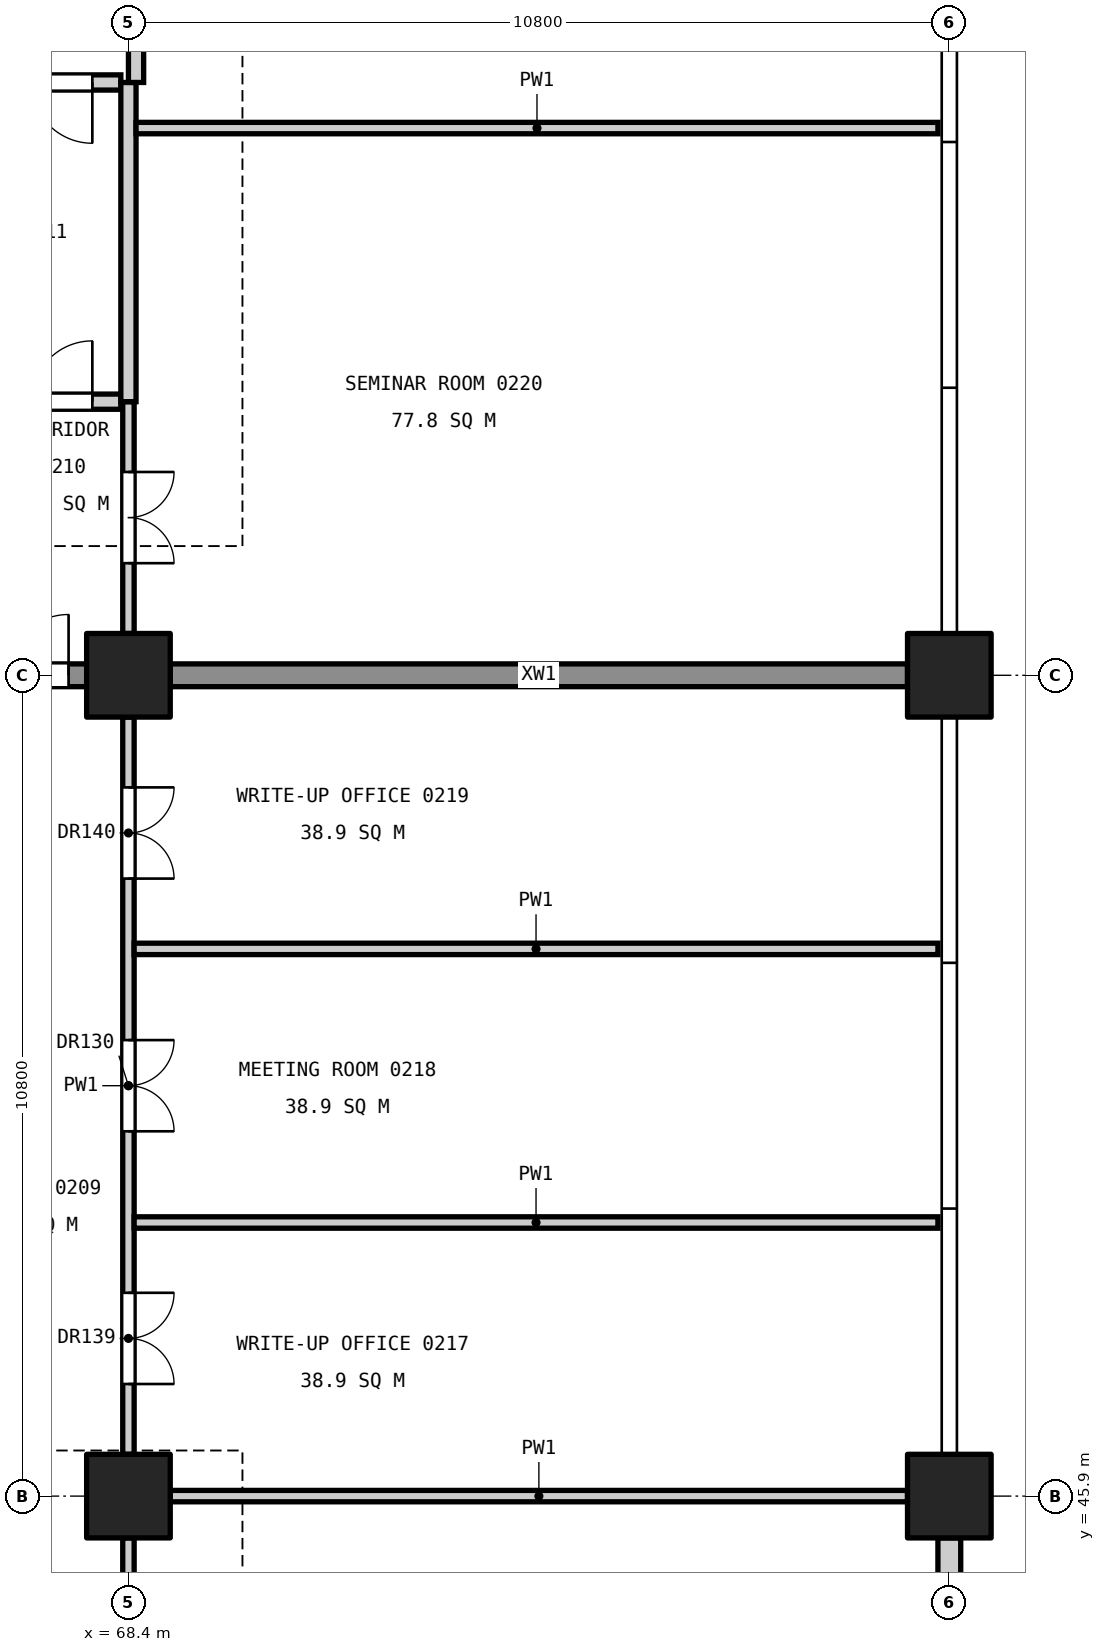
"""IFC4 building model, lengths in metres.
Left out: names, types, materials, properties, quantities, classifications, styles, units other than length and angle.
Written with IfcOpenShell. Run it as: python <this file> out.ifc"""

import sys

from ifc_helpers import new_model, si_unit, direction, frame, frame_2d, origin, origin_2d, place, context, subcontext, project, spatial, rectangle, extrude, element, fill, save


model = new_model("IFC4")
c1 = context("Model", 3, precision=1e-05, world=origin(), true_north=direction((0.0, 1.0)))
c2 = subcontext(c1, "Body", "Model", "MODEL_VIEW")
j1 = project(units=[si_unit("LENGTHUNIT", "METRE"), si_unit("PLANEANGLEUNIT", "RADIAN")], contexts=[c1])
p1 = place(None, origin())
s1 = spatial("IfcSite", under=j1, at=p1, CompositionType="ELEMENT")
p2 = place(p1, origin())
s2 = spatial("IfcBuilding", under=s1, at=p2, CompositionType="ELEMENT")
p3 = place(p2, frame((0.0, 0.0, 11.4)))
s3 = spatial("IfcBuildingStorey", under=s2, at=p3, CompositionType="ELEMENT", Elevation=11.4)
for number, where, z_axis, x_axis in (
    (1, (68.4, 45.9, 0.0), (0.0, 0.0, 1.0), (1.0, 0.0, 0.0)),
    (2, (68.4, 56.7, 0.0), (0.0, 0.0, 1.0), (1.0, 0.0, 0.0)),
    (3, (79.2, 45.9, 0.0), (0.0, 0.0, 1.0), (1.0, 0.0, 0.0)),
    (4, (79.2, 56.7, 0.0), (0.0, 0.0, 1.0), (1.0, 0.0, 0.0)),
):
    element("IfcColumn", number, at=place(p3, frame(where, z_axis=z_axis, x_axis=x_axis)), inside=s3, PredefinedType="COLUMN", context=c2, shape_type="SweptSolid", body=[
        extrude(rectangle(XDim=1.1, YDim=1.1, at=origin_2d()), origin(), (0.0, 0.0, 1.0), 5.4),
    ])
p4 = place(p3, frame((61.75, 56.7, 0.0), z_axis=(0.0, 0.0, 1.0), x_axis=(1.0, 0.0, 0.0)))
e5 = element("IfcWall", 5, at=p4, inside=s3, PredefinedType="SHEAR", context=c2, shape_type="SweptSolid", body=[
    extrude(rectangle(XDim=6.1, YDim=0.3, at=frame_2d((3.05, 0.0))), origin(), (0.0, 0.0, 1.0), 5.1),
])
p5 = place(p4, frame((4.262, 0.0, 0.0)))
e6 = element("IfcOpeningElement", 6, at=p5, cuts=e5, PredefinedType="OPENING", context=c2, shape_type="SweptSolid", body=[
    extrude(rectangle(XDim=1.6, YDim=2.1, at=frame_2d((0.8, 1.05))), frame((0.0, 0.16, 0.0), z_axis=(0.0, -1.0, 0.0), x_axis=(1.0, 0.0, 0.0)), (0.0, 0.0, 1.0), 0.32),
])
p6 = place(p3, frame((68.95, 56.7, 0.0), z_axis=(0.0, 0.0, 1.0), x_axis=(1.0, 0.0, 0.0)))
e7 = element("IfcWall", 7, at=p6, inside=s3, PredefinedType="SHEAR", context=c2, shape_type="SweptSolid", body=[
    extrude(rectangle(XDim=9.7, YDim=0.3, at=frame_2d((4.85, 0.0))), origin(), (0.0, 0.0, 1.0), 5.1),
])
p7 = place(p3, frame((79.2, 35.65, 0.0), z_axis=(0.0, 0.0, 1.0), x_axis=(0.0, 1.0, 0.0)))
e8 = element("IfcWall", 8, at=p7, inside=s3, PredefinedType="STANDARD", context=c2, shape_type="SweptSolid", body=[
    extrude(rectangle(XDim=9.7, YDim=0.3, at=frame_2d((4.85, 0.0))), origin(), (0.0, 0.0, 1.0), 4.0),
])
p8 = place(p3, frame((65.95, 60.3, 0.0), z_axis=(0.0, 0.0, 1.0), x_axis=(1.0, 0.0, 0.0)))
e9 = element("IfcWall", 9, at=p8, inside=s3, PredefinedType="PARTITIONING", context=c2, shape_type="SweptSolid", body=[
    extrude(rectangle(XDim=2.35, YDim=0.2, at=frame_2d((1.175, 0.0))), origin(), (0.0, 0.0, 1.0), 4.3),
])
p9 = place(p8, frame((0.375, 0.0, 0.0)))
e10 = element("IfcOpeningElement", 10, at=p9, cuts=e9, PredefinedType="OPENING", context=c2, shape_type="SweptSolid", body=[
    extrude(rectangle(XDim=1.6, YDim=2.1, at=frame_2d((0.8, 1.05))), frame((0.0, 0.11, 0.0), z_axis=(0.0, -1.0, 0.0), x_axis=(1.0, 0.0, 0.0)), (0.0, 0.0, 1.0), 0.22),
])
p10 = place(p3, frame((65.95, 64.5, 0.0), z_axis=(0.0, 0.0, 1.0), x_axis=(1.0, 0.0, 0.0)))
e11 = element("IfcWall", 11, at=p10, inside=s3, PredefinedType="PARTITIONING", context=c2, shape_type="SweptSolid", body=[
    extrude(rectangle(XDim=2.35, YDim=0.2, at=frame_2d((1.175, 0.0))), origin(), (0.0, 0.0, 1.0), 4.0),
])
p11 = place(p10, frame((0.375, 0.0, 0.0)))
e12 = element("IfcOpeningElement", 12, at=p11, cuts=e11, PredefinedType="OPENING", context=c2, shape_type="SweptSolid", body=[
    extrude(rectangle(XDim=1.6, YDim=2.1, at=frame_2d((0.8, 1.05))), frame((0.0, 0.11, 0.0), z_axis=(0.0, -1.0, 0.0), x_axis=(1.0, 0.0, 0.0)), (0.0, 0.0, 1.0), 0.22),
])
p12 = place(p3, frame((68.4, 41.9, 0.0), z_axis=(0.0, 0.0, 1.0), x_axis=(0.0, 1.0, 0.0)))
e13 = element("IfcWall", 13, at=p12, inside=s3, PredefinedType="PARTITIONING", context=c2, shape_type="SweptSolid", body=[
    extrude(rectangle(XDim=3.45, YDim=0.15, at=frame_2d((1.725, 0.0))), origin(), (0.0, 0.0, 1.0), 4.0),
])
p13 = place(p12, frame((1.125, 0.0, 0.0)))
e14 = element("IfcOpeningElement", 14, at=p13, cuts=e13, PredefinedType="OPENING", context=c2, shape_type="SweptSolid", body=[
    extrude(rectangle(XDim=1.2, YDim=2.1, at=frame_2d((0.6, 1.05))), frame((0.0, 0.085, 0.0), z_axis=(0.0, -1.0, 0.0), x_axis=(1.0, 0.0, 0.0)), (0.0, 0.0, 1.0), 0.17),
])
p14 = place(p3, frame((68.4, 46.45, 0.0), z_axis=(0.0, 0.0, 1.0), x_axis=(0.0, 1.0, 0.0)))
e15 = element("IfcWall", 15, at=p14, inside=s3, PredefinedType="PARTITIONING", context=c2, shape_type="SweptSolid", body=[
    extrude(rectangle(XDim=9.7, YDim=0.15, at=frame_2d((4.85, 0.0))), origin(), (0.0, 0.0, 1.0), 4.0),
])
p15 = place(p14, frame((4.25, 0.0, 0.0)))
e16 = element("IfcOpeningElement", 16, at=p15, cuts=e15, PredefinedType="OPENING", context=c2, shape_type="SweptSolid", body=[
    extrude(rectangle(XDim=1.2, YDim=2.1, at=frame_2d((0.6, 1.05))), frame((0.0, 0.085, 0.0), z_axis=(0.0, -1.0, 0.0), x_axis=(1.0, 0.0, 0.0)), (0.0, 0.0, 1.0), 0.17),
])
p16 = place(p14, frame((0.925, 0.0, 0.0)))
e17 = element("IfcOpeningElement", 17, at=p16, cuts=e15, PredefinedType="OPENING", context=c2, shape_type="SweptSolid", body=[
    extrude(rectangle(XDim=1.2, YDim=2.1, at=frame_2d((0.6, 1.05))), frame((0.0, 0.085, 0.0), z_axis=(0.0, -1.0, 0.0), x_axis=(1.0, 0.0, 0.0)), (0.0, 0.0, 1.0), 0.17),
])
p17 = place(p14, frame((7.575, 0.0, 0.0)))
e18 = element("IfcOpeningElement", 18, at=p17, cuts=e15, PredefinedType="OPENING", context=c2, shape_type="SweptSolid", body=[
    extrude(rectangle(XDim=1.2, YDim=2.1, at=frame_2d((0.6, 1.05))), frame((0.0, 0.085, 0.0), z_axis=(0.0, -1.0, 0.0), x_axis=(1.0, 0.0, 0.0)), (0.0, 0.0, 1.0), 0.17),
])
p18 = place(p3, frame((68.4, 57.25, 0.0), z_axis=(0.0, 0.0, 1.0), x_axis=(0.0, 1.0, 0.0)))
e19 = element("IfcWall", 19, at=p18, inside=s3, PredefinedType="PARTITIONING", context=c2, shape_type="SweptSolid", body=[
    extrude(rectangle(XDim=3.05, YDim=0.15, at=frame_2d((1.525, 0.0))), origin(), (0.0, 0.0, 1.0), 4.0),
])
p19 = place(p18, frame((0.925, 0.0, 0.0)))
e20 = element("IfcOpeningElement", 20, at=p19, cuts=e19, PredefinedType="OPENING", context=c2, shape_type="SweptSolid", body=[
    extrude(rectangle(XDim=1.2, YDim=2.1, at=frame_2d((0.6, 1.05))), frame((0.0, 0.085, 0.0), z_axis=(0.0, -1.0, 0.0), x_axis=(1.0, 0.0, 0.0)), (0.0, 0.0, 1.0), 0.17),
])
p20 = place(p3, frame((68.4, 60.3, 0.0), z_axis=(0.0, 0.0, 1.0), x_axis=(0.0, 1.0, 0.0)))
e21 = element("IfcWall", 21, at=p20, inside=s3, PredefinedType="PARTITIONING", context=c2, shape_type="SweptSolid", body=[
    extrude(rectangle(XDim=4.2, YDim=0.2, at=frame_2d((2.1, 0.0))), origin(), (0.0, 0.0, 1.0), 4.0),
])
p21 = place(p3, frame((68.5, 64.5, 0.0), z_axis=(0.0, 0.0, 1.0), x_axis=(0.0, 1.0, 0.0)))
e22 = element("IfcWall", 22, at=p21, inside=s3, PredefinedType="PARTITIONING", context=c2, shape_type="SweptSolid", body=[
    extrude(rectangle(XDim=2.45, YDim=0.2, at=frame_2d((1.225, 0.0))), origin(), (0.0, 0.0, 1.0), 4.0),
])
p22 = place(p3, frame((68.95, 45.9, 0.0), z_axis=(0.0, 0.0, 1.0), x_axis=(1.0, 0.0, 0.0)))
e23 = element("IfcWall", 23, at=p22, inside=s3, PredefinedType="PARTITIONING", context=c2, shape_type="SweptSolid", body=[
    extrude(rectangle(XDim=9.7, YDim=0.15, at=frame_2d((4.85, 0.0))), origin(), (0.0, 0.0, 1.0), 4.3),
])
for number, where, z_axis, x_axis in (
    (24, (68.475, 49.5, 0.0), (0.0, 0.0, 1.0), (1.0, 0.0, 0.0)),
    (25, (68.475, 53.1, 0.0), (0.0, 0.0, 1.0), (1.0, 0.0, 0.0)),
):
    element("IfcWall", number, at=place(p3, frame(where, z_axis=z_axis, x_axis=x_axis)), inside=s3, PredefinedType="PARTITIONING", context=c2, shape_type="SweptSolid", body=[
        extrude(rectangle(XDim=10.575, YDim=0.15, at=frame_2d((5.288, 0.0))), origin(), (0.0, 0.0, 1.0), 4.3),
    ])
p23 = place(p3, frame((68.5, 63.9, 0.0), z_axis=(0.0, 0.0, 1.0), x_axis=(1.0, 0.0, 0.0)))
e26 = element("IfcWall", 26, at=p23, inside=s3, PredefinedType="PARTITIONING", context=c2, shape_type="SweptSolid", body=[
    extrude(rectangle(XDim=10.55, YDim=0.15, at=frame_2d((5.275, 0.0))), origin(), (0.0, 0.0, 1.0), 4.3),
])
p24 = place(p15, frame((1.2, 0.0, 0.0), z_axis=(0.0, 0.0, 1.0), x_axis=(-1.0, 0.0, 0.0)))
e27 = element("IfcDoor", 27, at=p24, inside=s3, OperationType="DOUBLE_DOOR_SINGLE_SWING", PredefinedType="DOOR", context=c2, shape_type="SweptSolid", body=[
    extrude(rectangle(XDim=1.2, YDim=2.1, at=frame_2d((0.6, 1.05))), frame((0.0, 0.025, 0.0), z_axis=(0.0, -1.0, 0.0), x_axis=(1.0, 0.0, 0.0)), (0.0, 0.0, 1.0), 0.05),
])
fill(e16, e27)
p25 = place(p19, frame((1.2, 0.0, 0.0), z_axis=(0.0, 0.0, 1.0), x_axis=(-1.0, 0.0, 0.0)))
e28 = element("IfcDoor", 28, at=p25, inside=s3, OperationType="DOUBLE_DOOR_SINGLE_SWING", PredefinedType="DOOR", context=c2, shape_type="SweptSolid", body=[
    extrude(rectangle(XDim=1.2, YDim=2.1, at=frame_2d((0.6, 1.05))), frame((0.0, 0.025, 0.0), z_axis=(0.0, -1.0, 0.0), x_axis=(1.0, 0.0, 0.0)), (0.0, 0.0, 1.0), 0.05),
])
fill(e20, e28)
p26 = place(p16, frame((1.2, 0.0, 0.0), z_axis=(0.0, 0.0, 1.0), x_axis=(-1.0, 0.0, 0.0)))
e29 = element("IfcDoor", 29, at=p26, inside=s3, OperationType="DOUBLE_DOOR_SINGLE_SWING", PredefinedType="DOOR", context=c2, shape_type="SweptSolid", body=[
    extrude(rectangle(XDim=1.2, YDim=2.1, at=frame_2d((0.6, 1.05))), frame((0.0, 0.025, 0.0), z_axis=(0.0, -1.0, 0.0), x_axis=(1.0, 0.0, 0.0)), (0.0, 0.0, 1.0), 0.05),
])
fill(e17, e29)
p27 = place(p17, frame((1.2, 0.0, 0.0), z_axis=(0.0, 0.0, 1.0), x_axis=(-1.0, 0.0, 0.0)))
e30 = element("IfcDoor", 30, at=p27, inside=s3, OperationType="DOUBLE_DOOR_SINGLE_SWING", PredefinedType="DOOR", context=c2, shape_type="SweptSolid", body=[
    extrude(rectangle(XDim=1.2, YDim=2.1, at=frame_2d((0.6, 1.05))), frame((0.0, 0.025, 0.0), z_axis=(0.0, -1.0, 0.0), x_axis=(1.0, 0.0, 0.0)), (0.0, 0.0, 1.0), 0.05),
])
fill(e18, e30)
p28 = place(p9, origin())
e31 = element("IfcDoor", 31, at=p28, inside=s3, OperationType="DOUBLE_DOOR_SINGLE_SWING", PredefinedType="DOOR", context=c2, shape_type="SweptSolid", body=[
    extrude(rectangle(XDim=1.6, YDim=2.1, at=frame_2d((0.8, 1.05))), frame((0.0, 0.025, 0.0), z_axis=(0.0, -1.0, 0.0), x_axis=(1.0, 0.0, 0.0)), (0.0, 0.0, 1.0), 0.05),
])
fill(e10, e31)
p29 = place(p11, frame((1.6, 0.0, 0.0), z_axis=(0.0, 0.0, 1.0), x_axis=(-1.0, 0.0, 0.0)))
e32 = element("IfcDoor", 32, at=p29, inside=s3, OperationType="DOUBLE_DOOR_SINGLE_SWING", PredefinedType="DOOR", context=c2, shape_type="SweptSolid", body=[
    extrude(rectangle(XDim=1.6, YDim=2.1, at=frame_2d((0.8, 1.05))), frame((0.0, 0.025, 0.0), z_axis=(0.0, -1.0, 0.0), x_axis=(1.0, 0.0, 0.0)), (0.0, 0.0, 1.0), 0.05),
])
fill(e12, e32)
p30 = place(p5, origin())
e33 = element("IfcDoor", 33, at=p30, inside=s3, OperationType="DOUBLE_DOOR_SINGLE_SWING", PredefinedType="DOOR", context=c2, shape_type="SweptSolid", body=[
    extrude(rectangle(XDim=1.6, YDim=2.1, at=frame_2d((0.8, 1.05))), frame((0.0, 0.025, 0.0), z_axis=(0.0, -1.0, 0.0), x_axis=(1.0, 0.0, 0.0)), (0.0, 0.0, 1.0), 0.05),
])
fill(e6, e33)
save(model, sys.argv[1])
